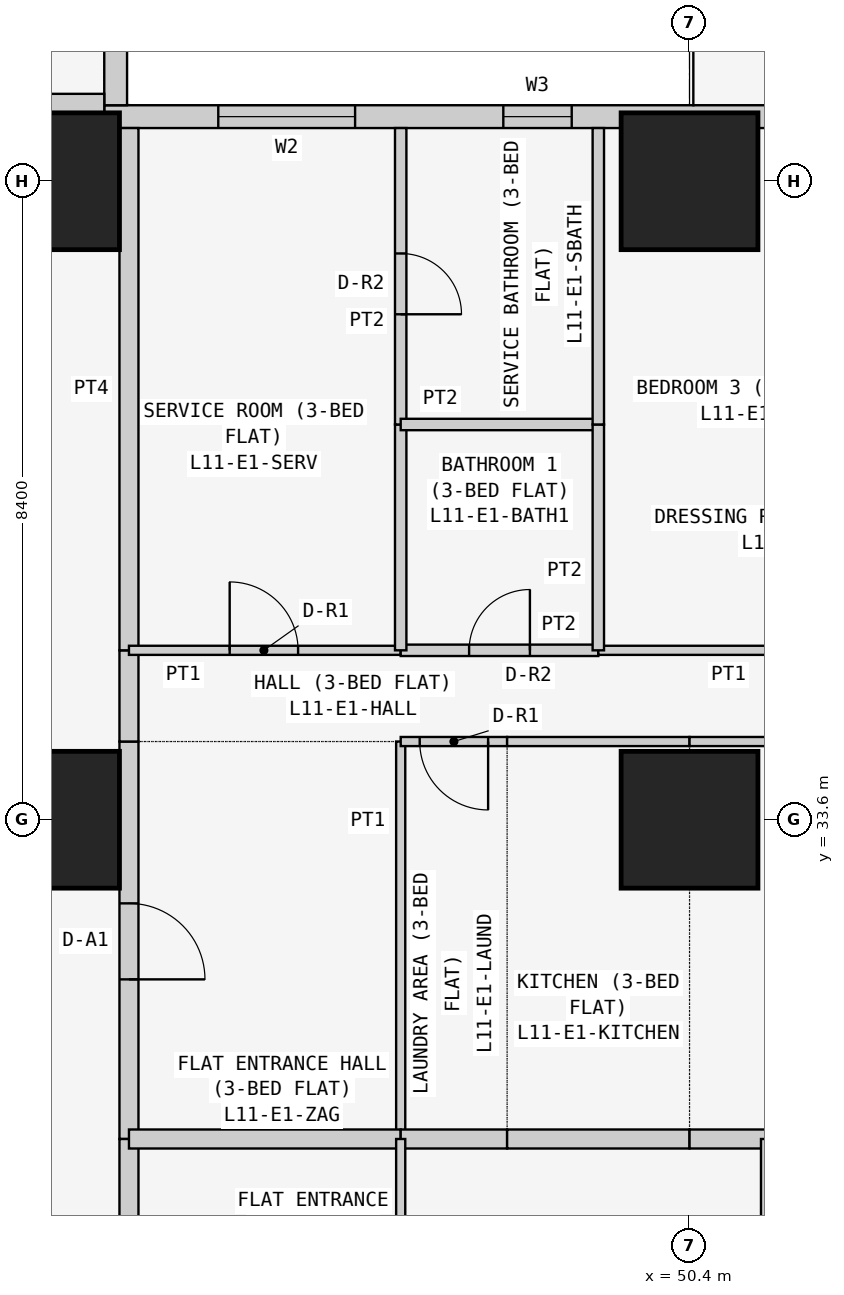
"""IFC4 building model, lengths in metres.
Left out: names, types, materials, properties, quantities, classifications, styles, units other than length and angle.
Written with IfcOpenShell. Run it as: python <this file> out.ifc"""

import sys

from ifc_helpers import new_model, si_unit, direction, frame, frame_2d, origin, origin_2d, place, context, subcontext, project, spatial, rectangle, extrude, element, fill, save


model = new_model("IFC4")
c1 = context("Model", 3, precision=1e-05, world=origin(), true_north=direction((0.0, 1.0)))
c2 = subcontext(c1, "Body", "Model", "MODEL_VIEW")
j1 = project(units=[si_unit("LENGTHUNIT", "METRE"), si_unit("PLANEANGLEUNIT", "RADIAN")], contexts=[c1])
p1 = place(None, origin())
s1 = spatial("IfcSite", under=j1, at=p1, CompositionType="ELEMENT")
p2 = place(p1, origin())
s2 = spatial("IfcBuilding", under=s1, at=p2, CompositionType="ELEMENT")
p3 = place(p2, frame((0.0, 0.0, 48.9)))
s3 = spatial("IfcBuildingStorey", under=s2, at=p3, CompositionType="ELEMENT", Elevation=48.9)
for number, where, z_axis, x_axis in (
    (1, (42.0, 33.6, 0.0), (0.0, 0.0, 1.0), (1.0, 0.0, 0.0)),
    (2, (42.0, 42.0, 0.0), (0.0, 0.0, 1.0), (1.0, 0.0, 0.0)),
    (3, (50.4, 33.6, 0.0), (0.0, 0.0, 1.0), (1.0, 0.0, 0.0)),
    (4, (50.4, 42.0, 0.0), (0.0, 0.0, 1.0), (1.0, 0.0, 0.0)),
):
    element("IfcColumn", number, at=place(p3, frame(where, z_axis=z_axis, x_axis=x_axis)), inside=s3, PredefinedType="COLUMN", context=c2, shape_type="SweptSolid", body=[
        extrude(rectangle(XDim=1.8, YDim=1.8, at=origin_2d()), origin(), (0.0, 0.0, 1.0), 3.6),
    ])
p4 = place(p3, frame((58.4, 42.85, 0.0), z_axis=(0.0, 0.0, 1.0), x_axis=(-1.0, 0.0, 0.0)))
e5 = element("IfcWall", 5, at=p4, inside=s3, PredefinedType="SOLIDWALL", context=c2, shape_type="SweptSolid", body=[
    extrude(rectangle(XDim=15.7, YDim=0.3, at=frame_2d((7.85, 0.0))), origin(), (0.0, 0.0, 1.0), 3.45),
])
p5 = place(p4, frame((12.4, 0.0, 0.9)))
e6 = element("IfcOpeningElement", 6, at=p5, cuts=e5, PredefinedType="OPENING", context=c2, shape_type="SweptSolid", body=[
    extrude(rectangle(XDim=1.8, YDim=1.5, at=frame_2d((0.9, 0.75))), frame((0.0, 0.16, 0.0), z_axis=(0.0, -1.0, 0.0), x_axis=(1.0, 0.0, 0.0)), (0.0, 0.0, 1.0), 0.32),
])
p6 = place(p4, frame((9.55, 0.0, 1.5)))
e7 = element("IfcOpeningElement", 7, at=p6, cuts=e5, PredefinedType="OPENING", context=c2, shape_type="SweptSolid", body=[
    extrude(rectangle(XDim=0.9, YDim=0.7, at=frame_2d((0.45, 0.35))), frame((0.0, 0.16, 0.0), z_axis=(0.0, -1.0, 0.0), x_axis=(1.0, 0.0, 0.0)), (0.0, 0.0, 1.0), 0.32),
])
p7 = place(p4, frame((5.1, 0.0, 0.9)))
e8 = element("IfcOpeningElement", 8, at=p7, cuts=e5, PredefinedType="OPENING", context=c2, shape_type="SweptSolid", body=[
    extrude(rectangle(XDim=1.8, YDim=1.5, at=frame_2d((0.9, 0.75))), frame((0.0, 0.16, 0.0), z_axis=(0.0, -1.0, 0.0), x_axis=(1.0, 0.0, 0.0)), (0.0, 0.0, 1.0), 0.32),
])
p8 = place(p4, frame((2.0, 0.0, 0.0)))
e9 = element("IfcOpeningElement", 9, at=p8, cuts=e5, PredefinedType="OPENING", context=c2, shape_type="SweptSolid", body=[
    extrude(rectangle(XDim=0.9, YDim=2.4, at=frame_2d((0.45, 1.2))), frame((0.0, 0.16, 0.0), z_axis=(0.0, -1.0, 0.0), x_axis=(1.0, 0.0, 0.0)), (0.0, 0.0, 1.0), 0.32),
])
p9 = place(p4, frame((0.7, 0.0, 0.9)))
e10 = element("IfcOpeningElement", 10, at=p9, cuts=e5, PredefinedType="OPENING", context=c2, shape_type="SweptSolid", body=[
    extrude(rectangle(XDim=1.2, YDim=1.5, at=frame_2d((0.6, 0.75))), frame((0.0, 0.16, 0.0), z_axis=(0.0, -1.0, 0.0), x_axis=(1.0, 0.0, 0.0)), (0.0, 0.0, 1.0), 0.32),
])
p10 = place(p3, frame((42.85, 43.0, 0.0), z_axis=(0.0, 0.0, 1.0), x_axis=(0.0, 1.0, 0.0)))
e11 = element("IfcWall", 11, at=p10, inside=s3, PredefinedType="SOLIDWALL", context=c2, shape_type="SweptSolid", body=[
    extrude(rectangle(XDim=15.4, YDim=0.3, at=frame_2d((7.7, 0.0))), origin(), (0.0, 0.0, 1.0), 3.45),
])
p11 = place(p10, frame((1.2, 0.0, 0.9)))
e12 = element("IfcOpeningElement", 12, at=p11, cuts=e11, PredefinedType="OPENING", context=c2, shape_type="SweptSolid", body=[
    extrude(rectangle(XDim=1.8, YDim=1.5, at=frame_2d((0.9, 0.75))), frame((0.0, 0.16, 0.0), z_axis=(0.0, -1.0, 0.0), x_axis=(1.0, 0.0, 0.0)), (0.0, 0.0, 1.0), 0.32),
])
p12 = place(p10, frame((4.95, 0.0, 1.5)))
e13 = element("IfcOpeningElement", 13, at=p12, cuts=e11, PredefinedType="OPENING", context=c2, shape_type="SweptSolid", body=[
    extrude(rectangle(XDim=0.9, YDim=0.7, at=frame_2d((0.45, 0.35))), frame((0.0, 0.16, 0.0), z_axis=(0.0, -1.0, 0.0), x_axis=(1.0, 0.0, 0.0)), (0.0, 0.0, 1.0), 0.32),
])
p13 = place(p10, frame((8.5, 0.0, 0.9)))
e14 = element("IfcOpeningElement", 14, at=p13, cuts=e11, PredefinedType="OPENING", context=c2, shape_type="SweptSolid", body=[
    extrude(rectangle(XDim=1.8, YDim=1.5, at=frame_2d((0.9, 0.75))), frame((0.0, 0.16, 0.0), z_axis=(0.0, -1.0, 0.0), x_axis=(1.0, 0.0, 0.0)), (0.0, 0.0, 1.0), 0.32),
])
p14 = place(p10, frame((12.5, 0.0, 0.0)))
e15 = element("IfcOpeningElement", 15, at=p14, cuts=e11, PredefinedType="OPENING", context=c2, shape_type="SweptSolid", body=[
    extrude(rectangle(XDim=0.9, YDim=2.4, at=frame_2d((0.45, 1.2))), frame((0.0, 0.16, 0.0), z_axis=(0.0, -1.0, 0.0), x_axis=(1.0, 0.0, 0.0)), (0.0, 0.0, 1.0), 0.32),
])
p15 = place(p10, frame((13.5, 0.0, 0.9)))
e16 = element("IfcOpeningElement", 16, at=p15, cuts=e11, PredefinedType="OPENING", context=c2, shape_type="SweptSolid", body=[
    extrude(rectangle(XDim=1.2, YDim=1.5, at=frame_2d((0.6, 0.75))), frame((0.0, 0.16, 0.0), z_axis=(0.0, -1.0, 0.0), x_axis=(1.0, 0.0, 0.0)), (0.0, 0.0, 1.0), 0.32),
])
p16 = place(p3, frame((35.829, 43.025, 0.0), z_axis=(0.0, 0.0, 1.0), x_axis=(1.0, 0.0, 0.0)))
e17 = element("IfcWall", 17, at=p16, inside=s3, PredefinedType="PARTITIONING", context=c2, shape_type="SweptSolid", body=[
    extrude(rectangle(XDim=6.871, YDim=0.25, at=frame_2d((3.436, 0.0))), origin(), (0.0, 0.0, 1.0), 3.45),
])
p17 = place(p3, frame((43.025, 34.629, 0.0), z_axis=(0.0, 0.0, 1.0), x_axis=(0.0, -1.0, 0.0)))
e18 = element("IfcWall", 18, at=p17, inside=s3, PredefinedType="PARTITIONING", context=c2, shape_type="SweptSolid", body=[
    extrude(rectangle(XDim=5.229, YDim=0.25, at=frame_2d((2.615, 0.0))), origin(), (0.0, 0.0, 1.0), 3.45),
])
p18 = place(p17, frame((2.129, 0.0, 0.0)))
e19 = element("IfcOpeningElement", 19, at=p18, cuts=e18, PredefinedType="OPENING", context=c2, shape_type="SweptSolid", body=[
    extrude(rectangle(XDim=1.0, YDim=2.1, at=frame_2d((0.5, 1.05))), frame((0.0, 0.135, 0.0), z_axis=(0.0, -1.0, 0.0), x_axis=(1.0, 0.0, 0.0)), (0.0, 0.0, 1.0), 0.27),
])
p19 = place(p3, frame((43.025, 35.829, 0.0), z_axis=(0.0, 0.0, 1.0), x_axis=(0.0, -1.0, 0.0)))
e20 = element("IfcWall", 20, at=p19, inside=s3, PredefinedType="PARTITIONING", context=c2, shape_type="SweptSolid", body=[
    extrude(rectangle(XDim=1.2, YDim=0.25, at=frame_2d((0.6, 0.0))), origin(), (0.0, 0.0, 1.0), 3.45),
])
p20 = place(p3, frame((43.025, 42.7, 0.0), z_axis=(0.0, 0.0, 1.0), x_axis=(0.0, -1.0, 0.0)))
e21 = element("IfcWall", 21, at=p20, inside=s3, PredefinedType="PARTITIONING", context=c2, shape_type="SweptSolid", body=[
    extrude(rectangle(XDim=6.871, YDim=0.25, at=frame_2d((3.436, 0.0))), origin(), (0.0, 0.0, 1.0), 3.45),
])
p21 = place(p3, frame((43.025, 29.4, 0.0), z_axis=(0.0, 0.0, 1.0), x_axis=(0.0, -1.0, 0.0)))
e22 = element("IfcWall", 22, at=p21, inside=s3, PredefinedType="PARTITIONING", context=c2, shape_type="SweptSolid", body=[
    extrude(rectangle(XDim=5.229, YDim=0.25, at=frame_2d((2.615, 0.0))), origin(), (0.0, 0.0, 1.0), 3.45),
])
p22 = place(p21, frame((2.1, 0.0, 0.0)))
e23 = element("IfcOpeningElement", 23, at=p22, cuts=e22, PredefinedType="OPENING", context=c2, shape_type="SweptSolid", body=[
    extrude(rectangle(XDim=1.0, YDim=2.1, at=frame_2d((0.5, 1.05))), frame((0.0, 0.135, 0.0), z_axis=(0.0, -1.0, 0.0), x_axis=(1.0, 0.0, 0.0)), (0.0, 0.0, 1.0), 0.27),
])
p23 = place(p3, frame((46.6, 29.4, 0.0), z_axis=(0.0, 0.0, 1.0), x_axis=(0.0, 1.0, 0.0)))
e24 = element("IfcWall", 24, at=p23, inside=s3, PredefinedType="PARTITIONING", context=c2, shape_type="SweptSolid", body=[
    extrude(rectangle(XDim=5.229, YDim=0.12, at=frame_2d((2.615, 0.0))), origin(), (0.0, 0.0, 1.0), 3.45),
])
p24 = place(p3, frame((43.025, 29.4, 0.0), z_axis=(0.0, 0.0, 1.0), x_axis=(1.0, 0.0, 0.0)))
e25 = element("IfcWall", 25, at=p24, inside=s3, PredefinedType="PARTITIONING", context=c2, shape_type="SweptSolid", body=[
    extrude(rectangle(XDim=3.575, YDim=0.25, at=frame_2d((1.788, 0.0))), origin(), (0.0, 0.0, 1.0), 3.45),
])
p25 = place(p3, frame((48.0, 34.629, 0.0), z_axis=(0.0, 0.0, 1.0), x_axis=(-1.0, 0.0, 0.0)))
e26 = element("IfcWall", 26, at=p25, inside=s3, PredefinedType="PARTITIONING", context=c2, shape_type="SweptSolid", body=[
    extrude(rectangle(XDim=1.4, YDim=0.12, at=frame_2d((0.7, 0.0))), origin(), (0.0, 0.0, 1.0), 3.45),
])
p26 = place(p25, frame((0.25, 0.0, 0.0)))
e27 = element("IfcOpeningElement", 27, at=p26, cuts=e26, PredefinedType="OPENING", context=c2, shape_type="SweptSolid", body=[
    extrude(rectangle(XDim=0.9, YDim=2.1, at=frame_2d((0.45, 1.05))), frame((0.0, 0.07, 0.0), z_axis=(0.0, -1.0, 0.0), x_axis=(1.0, 0.0, 0.0)), (0.0, 0.0, 1.0), 0.14),
])
p27 = place(p3, frame((46.6, 29.4, 0.0), z_axis=(0.0, 0.0, 1.0), x_axis=(1.0, 0.0, 0.0)))
e28 = element("IfcWall", 28, at=p27, inside=s3, PredefinedType="PARTITIONING", context=c2, shape_type="SweptSolid", body=[
    extrude(rectangle(XDim=1.4, YDim=0.25, at=frame_2d((0.7, 0.0))), origin(), (0.0, 0.0, 1.0), 3.45),
])
p28 = place(p3, frame((50.4, 34.629, 0.0), z_axis=(0.0, 0.0, 1.0), x_axis=(-1.0, 0.0, 0.0)))
e29 = element("IfcWall", 29, at=p28, inside=s3, PredefinedType="PARTITIONING", context=c2, shape_type="SweptSolid", body=[
    extrude(rectangle(XDim=2.4, YDim=0.12, at=frame_2d((1.2, 0.0))), origin(), (0.0, 0.0, 1.0), 3.45),
])
p29 = place(p3, frame((48.0, 29.4, 0.0), z_axis=(0.0, 0.0, 1.0), x_axis=(1.0, 0.0, 0.0)))
e30 = element("IfcWall", 30, at=p29, inside=s3, PredefinedType="PARTITIONING", context=c2, shape_type="SweptSolid", body=[
    extrude(rectangle(XDim=2.4, YDim=0.25, at=frame_2d((1.2, 0.0))), origin(), (0.0, 0.0, 1.0), 3.45),
])
p30 = place(p3, frame((55.3, 34.629, 0.0), z_axis=(0.0, 0.0, 1.0), x_axis=(-1.0, 0.0, 0.0)))
e31 = element("IfcWall", 31, at=p30, inside=s3, PredefinedType="PARTITIONING", context=c2, shape_type="SweptSolid", body=[
    extrude(rectangle(XDim=4.9, YDim=0.12, at=frame_2d((2.45, 0.0))), origin(), (0.0, 0.0, 1.0), 3.45),
])
p31 = place(p30, frame((1.25, 0.0, 0.0)))
e32 = element("IfcOpeningElement", 32, at=p31, cuts=e31, PredefinedType="OPENING", context=c2, shape_type="SweptSolid", body=[
    extrude(rectangle(XDim=0.9, YDim=2.1, at=frame_2d((0.45, 1.05))), frame((0.0, 0.07, 0.0), z_axis=(0.0, -1.0, 0.0), x_axis=(1.0, 0.0, 0.0)), (0.0, 0.0, 1.0), 0.14),
])
p32 = place(p3, frame((50.4, 29.4, 0.0), z_axis=(0.0, 0.0, 1.0), x_axis=(1.0, 0.0, 0.0)))
e33 = element("IfcWall", 33, at=p32, inside=s3, PredefinedType="PARTITIONING", context=c2, shape_type="SweptSolid", body=[
    extrude(rectangle(XDim=1.0, YDim=0.25, at=frame_2d((0.5, 0.0))), origin(), (0.0, 0.0, 1.0), 3.45),
])
p33 = place(p3, frame((46.6, 35.829, 0.0), z_axis=(0.0, 0.0, 1.0), x_axis=(-1.0, 0.0, 0.0)))
e34 = element("IfcWall", 34, at=p33, inside=s3, PredefinedType="PARTITIONING", context=c2, shape_type="SweptSolid", body=[
    extrude(rectangle(XDim=3.575, YDim=0.12, at=frame_2d((1.788, 0.0))), origin(), (0.0, 0.0, 1.0), 3.45),
])
p34 = place(p33, frame((1.35, 0.0, 0.0)))
e35 = element("IfcOpeningElement", 35, at=p34, cuts=e34, PredefinedType="OPENING", context=c2, shape_type="SweptSolid", body=[
    extrude(rectangle(XDim=0.9, YDim=2.1, at=frame_2d((0.45, 1.05))), frame((0.0, 0.07, 0.0), z_axis=(0.0, -1.0, 0.0), x_axis=(1.0, 0.0, 0.0)), (0.0, 0.0, 1.0), 0.14),
])
p35 = place(p3, frame((49.2, 35.829, 0.0), z_axis=(0.0, 0.0, 1.0), x_axis=(-1.0, 0.0, 0.0)))
e36 = element("IfcWall", 36, at=p35, inside=s3, PredefinedType="PARTITIONING", context=c2, shape_type="SweptSolid", body=[
    extrude(rectangle(XDim=2.6, YDim=0.15, at=frame_2d((1.3, 0.0))), origin(), (0.0, 0.0, 1.0), 3.45),
])
p36 = place(p35, frame((0.9, 0.0, 0.0)))
e37 = element("IfcOpeningElement", 37, at=p36, cuts=e36, PredefinedType="OPENING", context=c2, shape_type="SweptSolid", body=[
    extrude(rectangle(XDim=0.8, YDim=2.1, at=frame_2d((0.4, 1.05))), frame((0.0, 0.085, 0.0), z_axis=(0.0, -1.0, 0.0), x_axis=(1.0, 0.0, 0.0)), (0.0, 0.0, 1.0), 0.17),
])
p37 = place(p3, frame((54.1, 35.829, 0.0), z_axis=(0.0, 0.0, 1.0), x_axis=(-1.0, 0.0, 0.0)))
e38 = element("IfcWall", 38, at=p37, inside=s3, PredefinedType="PARTITIONING", context=c2, shape_type="SweptSolid", body=[
    extrude(rectangle(XDim=4.9, YDim=0.12, at=frame_2d((2.45, 0.0))), origin(), (0.0, 0.0, 1.0), 3.45),
])
p38 = place(p37, frame((1.65, 0.0, 0.0)))
e39 = element("IfcOpeningElement", 39, at=p38, cuts=e38, PredefinedType="OPENING", context=c2, shape_type="SweptSolid", body=[
    extrude(rectangle(XDim=0.9, YDim=2.1, at=frame_2d((0.45, 1.05))), frame((0.0, 0.07, 0.0), z_axis=(0.0, -1.0, 0.0), x_axis=(1.0, 0.0, 0.0)), (0.0, 0.0, 1.0), 0.14),
])
p39 = place(p3, frame((46.6, 35.829, 0.0), z_axis=(0.0, 0.0, 1.0), x_axis=(0.0, 1.0, 0.0)))
e40 = element("IfcWall", 40, at=p39, inside=s3, PredefinedType="PARTITIONING", context=c2, shape_type="SweptSolid", body=[
    extrude(rectangle(XDim=2.971, YDim=0.15, at=frame_2d((1.485, 0.0))), origin(), (0.0, 0.0, 1.0), 3.45),
])
p40 = place(p3, frame((46.6, 38.8, 0.0), z_axis=(0.0, 0.0, 1.0), x_axis=(0.0, 1.0, 0.0)))
e41 = element("IfcWall", 41, at=p40, inside=s3, PredefinedType="PARTITIONING", context=c2, shape_type="SweptSolid", body=[
    extrude(rectangle(XDim=3.9, YDim=0.15, at=frame_2d((1.95, 0.0))), origin(), (0.0, 0.0, 1.0), 3.45),
])
p41 = place(p40, frame((1.45, 0.0, 0.0)))
e42 = element("IfcOpeningElement", 42, at=p41, cuts=e41, PredefinedType="OPENING", context=c2, shape_type="SweptSolid", body=[
    extrude(rectangle(XDim=0.8, YDim=2.1, at=frame_2d((0.4, 1.05))), frame((0.0, 0.085, 0.0), z_axis=(0.0, -1.0, 0.0), x_axis=(1.0, 0.0, 0.0)), (0.0, 0.0, 1.0), 0.17),
])
p42 = place(p3, frame((49.2, 38.8, 0.0), z_axis=(0.0, 0.0, 1.0), x_axis=(-1.0, 0.0, 0.0)))
e43 = element("IfcWall", 43, at=p42, inside=s3, PredefinedType="PARTITIONING", context=c2, shape_type="SweptSolid", body=[
    extrude(rectangle(XDim=2.6, YDim=0.15, at=frame_2d((1.3, 0.0))), origin(), (0.0, 0.0, 1.0), 3.45),
])
p43 = place(p3, frame((49.2, 35.829, 0.0), z_axis=(0.0, 0.0, 1.0), x_axis=(0.0, 1.0, 0.0)))
e44 = element("IfcWall", 44, at=p43, inside=s3, PredefinedType="PARTITIONING", context=c2, shape_type="SweptSolid", body=[
    extrude(rectangle(XDim=2.971, YDim=0.15, at=frame_2d((1.485, 0.0))), origin(), (0.0, 0.0, 1.0), 3.45),
])
p44 = place(p3, frame((49.2, 38.8, 0.0), z_axis=(0.0, 0.0, 1.0), x_axis=(0.0, 1.0, 0.0)))
e45 = element("IfcWall", 45, at=p44, inside=s3, PredefinedType="PARTITIONING", context=c2, shape_type="SweptSolid", body=[
    extrude(rectangle(XDim=3.9, YDim=0.15, at=frame_2d((1.95, 0.0))), origin(), (0.0, 0.0, 1.0), 3.45),
])
for number, where, z_axis, x_axis in (
    (46, (46.6, 29.4, 0.0), (0.0, 0.0, 1.0), (0.0, -1.0, 0.0)),
    (47, (51.4, 29.4, 0.0), (0.0, 0.0, 1.0), (0.0, -1.0, 0.0)),
):
    element("IfcWall", number, at=place(p3, frame(where, z_axis=z_axis, x_axis=x_axis)), inside=s3, PredefinedType="PARTITIONING", context=c2, shape_type="SweptSolid", body=[
        extrude(rectangle(XDim=5.229, YDim=0.12, at=frame_2d((2.615, 0.0))), origin(), (0.0, 0.0, 1.0), 3.45),
    ])
p45 = place(p5, origin())
e48 = element("IfcWindow", 48, at=p45, inside=s3, PartitioningType="SINGLE_PANEL", PredefinedType="WINDOW", context=c2, shape_type="SweptSolid", body=[
    extrude(rectangle(XDim=1.8, YDim=1.5, at=frame_2d((0.9, 0.75))), frame((0.0, 0.03, 0.0), z_axis=(0.0, -1.0, 0.0), x_axis=(1.0, 0.0, 0.0)), (0.0, 0.0, 1.0), 0.06),
])
fill(e6, e48)
p46 = place(p6, origin())
e49 = element("IfcWindow", 49, at=p46, inside=s3, PartitioningType="SINGLE_PANEL", PredefinedType="WINDOW", context=c2, shape_type="SweptSolid", body=[
    extrude(rectangle(XDim=0.9, YDim=0.7, at=frame_2d((0.45, 0.35))), frame((0.0, 0.03, 0.0), z_axis=(0.0, -1.0, 0.0), x_axis=(1.0, 0.0, 0.0)), (0.0, 0.0, 1.0), 0.06),
])
fill(e7, e49)
p47 = place(p18, origin())
e50 = element("IfcDoor", 50, at=p47, inside=s3, OperationType="SINGLE_SWING_RIGHT", PredefinedType="DOOR", context=c2, shape_type="SweptSolid", body=[
    extrude(rectangle(XDim=1.0, YDim=2.1, at=frame_2d((0.5, 1.05))), frame((0.0, 0.025, 0.0), z_axis=(0.0, -1.0, 0.0), x_axis=(1.0, 0.0, 0.0)), (0.0, 0.0, 1.0), 0.05),
])
fill(e19, e50)
p48 = place(p26, origin())
e51 = element("IfcDoor", 51, at=p48, inside=s3, OperationType="SINGLE_SWING_LEFT", PredefinedType="DOOR", context=c2, shape_type="SweptSolid", body=[
    extrude(rectangle(XDim=0.9, YDim=2.1, at=frame_2d((0.45, 1.05))), frame((0.0, 0.025, 0.0), z_axis=(0.0, -1.0, 0.0), x_axis=(1.0, 0.0, 0.0)), (0.0, 0.0, 1.0), 0.05),
])
fill(e27, e51)
p49 = place(p34, frame((0.9, 0.0, 0.0), z_axis=(0.0, 0.0, 1.0), x_axis=(-1.0, 0.0, 0.0)))
e52 = element("IfcDoor", 52, at=p49, inside=s3, OperationType="SINGLE_SWING_LEFT", PredefinedType="DOOR", context=c2, shape_type="SweptSolid", body=[
    extrude(rectangle(XDim=0.9, YDim=2.1, at=frame_2d((0.45, 1.05))), frame((0.0, 0.025, 0.0), z_axis=(0.0, -1.0, 0.0), x_axis=(1.0, 0.0, 0.0)), (0.0, 0.0, 1.0), 0.05),
])
fill(e35, e52)
p50 = place(p41, frame((0.8, 0.0, 0.0), z_axis=(0.0, 0.0, 1.0), x_axis=(-1.0, 0.0, 0.0)))
e53 = element("IfcDoor", 53, at=p50, inside=s3, OperationType="SINGLE_SWING_RIGHT", PredefinedType="DOOR", context=c2, shape_type="SweptSolid", body=[
    extrude(rectangle(XDim=0.8, YDim=2.1, at=frame_2d((0.4, 1.05))), frame((0.0, 0.025, 0.0), z_axis=(0.0, -1.0, 0.0), x_axis=(1.0, 0.0, 0.0)), (0.0, 0.0, 1.0), 0.05),
])
fill(e42, e53)
p51 = place(p36, frame((0.8, 0.0, 0.0), z_axis=(0.0, 0.0, 1.0), x_axis=(-1.0, 0.0, 0.0)))
e54 = element("IfcDoor", 54, at=p51, inside=s3, OperationType="SINGLE_SWING_RIGHT", PredefinedType="DOOR", context=c2, shape_type="SweptSolid", body=[
    extrude(rectangle(XDim=0.8, YDim=2.1, at=frame_2d((0.4, 1.05))), frame((0.0, 0.025, 0.0), z_axis=(0.0, -1.0, 0.0), x_axis=(1.0, 0.0, 0.0)), (0.0, 0.0, 1.0), 0.05),
])
fill(e37, e54)
save(model, sys.argv[1])
